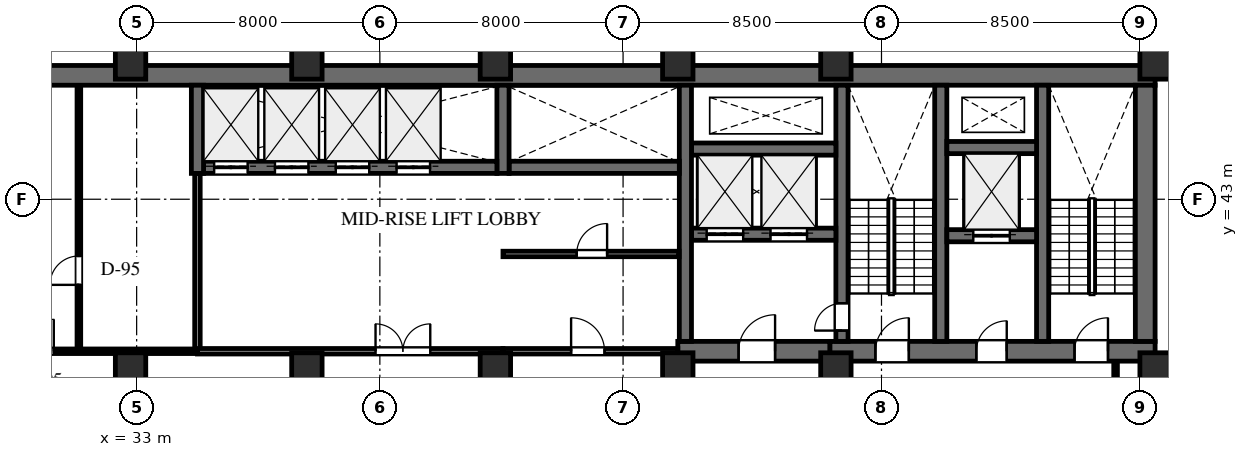
"""IFC4 building model, lengths in metres.
Left out: names, types, materials, properties, quantities, classifications, styles, units other than length and angle.
Written with IfcOpenShell. Run it as: python <this file> out.ifc"""

import sys

from ifc_helpers import new_model, si_unit, direction, frame, frame_2d, origin, origin_2d, place, context, subcontext, project, spatial, rectangle, extrude, element, fill, save


model = new_model("IFC4")
c1 = context("Model", 3, precision=1e-05, world=origin(), true_north=direction((0.0, 1.0)))
c2 = subcontext(c1, "Body", "Model", "MODEL_VIEW")
j1 = project(units=[si_unit("LENGTHUNIT", "METRE"), si_unit("PLANEANGLEUNIT", "RADIAN")], contexts=[c1])
p1 = place(None, origin())
s1 = spatial("IfcSite", under=j1, at=p1, CompositionType="ELEMENT")
p2 = place(p1, origin())
s2 = spatial("IfcBuilding", under=s1, at=p2, CompositionType="ELEMENT")
p3 = place(p2, frame((0.0, 0.0, 136.0)))
s3 = spatial("IfcBuildingStorey", under=s2, at=p3, CompositionType="ELEMENT", Elevation=136.0)
p4 = place(p3, frame((22.9, 47.075, 0.0), z_axis=(0.0, 0.0, 1.0), x_axis=(1.0, 0.0, 0.0)))
e1 = element("IfcWall", 1, at=p4, inside=s3, PredefinedType="SHEAR", context=c2, shape_type="SweptSolid", body=[
    extrude(rectangle(XDim=43.6, YDim=0.65, at=frame_2d((21.8, 0.0))), origin(), (0.0, 0.0, 1.0), 4.0),
])
p5 = place(p3, frame((55.8, 38.0, 0.0), z_axis=(0.0, 0.0, 1.0), x_axis=(1.0, 0.0, 0.0)))
e2 = element("IfcWall", 2, at=p5, inside=s3, PredefinedType="SHEAR", context=c2, shape_type="SweptSolid", body=[
    extrude(rectangle(XDim=10.7, YDim=0.65, at=frame_2d((5.35, 0.0))), origin(), (0.0, 0.0, 1.0), 4.0),
])
p6 = place(p5, frame((1.5, 0.0, 0.0)))
e3 = element("IfcOpeningElement", 3, at=p6, cuts=e2, PredefinedType="OPENING", context=c2, shape_type="SweptSolid", body=[
    extrude(rectangle(XDim=1.1, YDim=2.2, at=frame_2d((0.55, 1.1))), frame((0.0, 0.335, 0.0), z_axis=(0.0, -1.0, 0.0), x_axis=(1.0, 0.0, 0.0)), (0.0, 0.0, 1.0), 0.67),
])
p7 = place(p5, frame((4.82, 0.0, 0.0)))
e4 = element("IfcOpeningElement", 4, at=p7, cuts=e2, PredefinedType="OPENING", context=c2, shape_type="SweptSolid", body=[
    extrude(rectangle(XDim=1.0, YDim=2.15, at=frame_2d((0.5, 1.075))), frame((0.0, 0.335, 0.0), z_axis=(0.0, -1.0, 0.0), x_axis=(1.0, 0.0, 0.0)), (0.0, 0.0, 1.0), 0.67),
])
p8 = place(p5, frame((8.05, 0.0, 0.0)))
e5 = element("IfcOpeningElement", 5, at=p8, cuts=e2, PredefinedType="OPENING", context=c2, shape_type="SweptSolid", body=[
    extrude(rectangle(XDim=1.1, YDim=2.2, at=frame_2d((0.55, 1.1))), frame((0.0, 0.335, 0.0), z_axis=(0.0, -1.0, 0.0), x_axis=(1.0, 0.0, 0.0)), (0.0, 0.0, 1.0), 0.67),
])
p9 = place(p3, frame((66.175, 38.325, 0.0), z_axis=(0.0, 0.0, 1.0), x_axis=(0.0, 1.0, 0.0)))
e6 = element("IfcWall", 6, at=p9, inside=s3, PredefinedType="SHEAR", context=c2, shape_type="SweptSolid", body=[
    extrude(rectangle(XDim=8.425, YDim=0.65, at=frame_2d((4.212, 0.0))), origin(), (0.0, 0.0, 1.0), 4.0),
])
for number, where, z_axis, x_axis in (
    (7, (62.8, 38.325, 0.0), (0.0, 0.0, 1.0), (0.0, 1.0, 0.0)),
    (8, (59.45, 38.325, 0.0), (0.0, 0.0, 1.0), (0.0, 1.0, 0.0)),
):
    element("IfcWall", number, at=place(p3, frame(where, z_axis=z_axis, x_axis=x_axis)), inside=s3, PredefinedType="SHEAR", context=c2, shape_type="SweptSolid", body=[
        extrude(rectangle(XDim=8.425, YDim=0.4, at=frame_2d((4.212, 0.0))), origin(), (0.0, 0.0, 1.0), 4.0),
    ])
p10 = place(p3, frame((56.2, 38.325, 0.0), z_axis=(0.0, 0.0, 1.0), x_axis=(0.0, 1.0, 0.0)))
e9 = element("IfcWall", 9, at=p10, inside=s3, PredefinedType="SHEAR", context=c2, shape_type="SweptSolid", body=[
    extrude(rectangle(XDim=8.425, YDim=0.4, at=frame_2d((4.212, 0.0))), origin(), (0.0, 0.0, 1.0), 4.0),
])
p11 = place(p10, frame((0.355, 0.0, 0.0)))
e10 = element("IfcOpeningElement", 10, at=p11, cuts=e9, PredefinedType="OPENING", context=c2, shape_type="SweptSolid", body=[
    extrude(rectangle(XDim=0.9, YDim=2.15, at=frame_2d((0.45, 1.075))), frame((0.0, 0.21, 0.0), z_axis=(0.0, -1.0, 0.0), x_axis=(1.0, 0.0, 0.0)), (0.0, 0.0, 1.0), 0.42),
])
p12 = place(p3, frame((59.65, 41.8, 0.0), z_axis=(0.0, 0.0, 1.0), x_axis=(1.0, 0.0, 0.0)))
e11 = element("IfcWall", 11, at=p12, inside=s3, PredefinedType="SHEAR", context=c2, shape_type="SweptSolid", body=[
    extrude(rectangle(XDim=2.95, YDim=0.4, at=frame_2d((1.475, 0.0))), origin(), (0.0, 0.0, 1.0), 4.0),
])
p13 = place(p12, frame((0.87, 0.0, 0.0)))
e12 = element("IfcOpeningElement", 12, at=p13, cuts=e11, PredefinedType="OPENING", context=c2, shape_type="SweptSolid", body=[
    extrude(rectangle(XDim=1.2, YDim=2.2, at=frame_2d((0.6, 1.1))), frame((0.0, 0.21, 0.0), z_axis=(0.0, -1.0, 0.0), x_axis=(1.0, 0.0, 0.0)), (0.0, 0.0, 1.0), 0.42),
])
p14 = place(p3, frame((59.65, 44.7, 0.0), z_axis=(0.0, 0.0, 1.0), x_axis=(1.0, 0.0, 0.0)))
e13 = element("IfcWall", 13, at=p14, inside=s3, PredefinedType="SHEAR", context=c2, shape_type="SweptSolid", body=[
    extrude(rectangle(XDim=2.95, YDim=0.4, at=frame_2d((1.475, 0.0))), origin(), (0.0, 0.0, 1.0), 4.0),
])
p15 = place(p3, frame((50.8, 38.0, 0.0), z_axis=(0.0, 0.0, 1.0), x_axis=(1.0, 0.0, 0.0)))
e14 = element("IfcWall", 14, at=p15, inside=s3, PredefinedType="SHEAR", context=c2, shape_type="SweptSolid", body=[
    extrude(rectangle(XDim=5.0, YDim=0.65, at=frame_2d((2.5, 0.0))), origin(), (0.0, 0.0, 1.0), 4.0),
])
p16 = place(p15, frame((2.0, 0.0, 0.0)))
e15 = element("IfcOpeningElement", 15, at=p16, cuts=e14, PredefinedType="OPENING", context=c2, shape_type="SweptSolid", body=[
    extrude(rectangle(XDim=1.2, YDim=2.2, at=frame_2d((0.6, 1.1))), frame((0.0, 0.335, 0.0), z_axis=(0.0, -1.0, 0.0), x_axis=(1.0, 0.0, 0.0)), (0.0, 0.0, 1.0), 0.67),
])
p17 = place(p3, frame((51.25, 41.85, 0.0), z_axis=(0.0, 0.0, 1.0), x_axis=(1.0, 0.0, 0.0)))
e16 = element("IfcWall", 16, at=p17, inside=s3, PredefinedType="SHEAR", context=c2, shape_type="SweptSolid", body=[
    extrude(rectangle(XDim=4.75, YDim=0.4, at=frame_2d((2.375, 0.0))), origin(), (0.0, 0.0, 1.0), 4.0),
])
p18 = place(p17, frame((0.5, 0.0, 0.0)))
e17 = element("IfcOpeningElement", 17, at=p18, cuts=e16, PredefinedType="OPENING", context=c2, shape_type="SweptSolid", body=[
    extrude(rectangle(XDim=1.2, YDim=2.2, at=frame_2d((0.6, 1.1))), frame((0.0, 0.21, 0.0), z_axis=(0.0, -1.0, 0.0), x_axis=(1.0, 0.0, 0.0)), (0.0, 0.0, 1.0), 0.42),
])
p19 = place(p17, frame((2.6, 0.0, 0.0)))
e18 = element("IfcOpeningElement", 18, at=p19, cuts=e16, PredefinedType="OPENING", context=c2, shape_type="SweptSolid", body=[
    extrude(rectangle(XDim=1.2, YDim=2.2, at=frame_2d((0.6, 1.1))), frame((0.0, 0.21, 0.0), z_axis=(0.0, -1.0, 0.0), x_axis=(1.0, 0.0, 0.0)), (0.0, 0.0, 1.0), 0.42),
])
p20 = place(p3, frame((51.25, 44.65, 0.0), z_axis=(0.0, 0.0, 1.0), x_axis=(1.0, 0.0, 0.0)))
e19 = element("IfcWall", 19, at=p20, inside=s3, PredefinedType="SHEAR", context=c2, shape_type="SweptSolid", body=[
    extrude(rectangle(XDim=4.75, YDim=0.4, at=frame_2d((2.375, 0.0))), origin(), (0.0, 0.0, 1.0), 4.0),
])
p21 = place(p3, frame((51.05, 38.325, 0.0), z_axis=(0.0, 0.0, 1.0), x_axis=(0.0, 1.0, 0.0)))
e20 = element("IfcWall", 20, at=p21, inside=s3, PredefinedType="SHEAR", context=c2, shape_type="SweptSolid", body=[
    extrude(rectangle(XDim=8.425, YDim=0.4, at=frame_2d((4.212, 0.0))), origin(), (0.0, 0.0, 1.0), 4.0),
])
p22 = place(p3, frame((45.25, 44.05, 0.0), z_axis=(0.0, 0.0, 1.0), x_axis=(1.0, 0.0, 0.0)))
e21 = element("IfcWall", 21, at=p22, inside=s3, PredefinedType="SHEAR", context=c2, shape_type="SweptSolid", body=[
    extrude(rectangle(XDim=5.6, YDim=0.4, at=frame_2d((2.8, 0.0))), origin(), (0.0, 0.0, 1.0), 4.0),
])
p23 = place(p3, frame((45.05, 43.85, 0.0), z_axis=(0.0, 0.0, 1.0), x_axis=(0.0, 1.0, 0.0)))
e22 = element("IfcWall", 22, at=p23, inside=s3, PredefinedType="SHEAR", context=c2, shape_type="SweptSolid", body=[
    extrude(rectangle(XDim=2.9, YDim=0.4, at=frame_2d((1.45, 0.0))), origin(), (0.0, 0.0, 1.0), 4.0),
])
p24 = place(p3, frame((35.2, 44.05, 0.0), z_axis=(0.0, 0.0, 1.0), x_axis=(1.0, 0.0, 0.0)))
e23 = element("IfcWall", 23, at=p24, inside=s3, PredefinedType="SHEAR", context=c2, shape_type="SweptSolid", body=[
    extrude(rectangle(XDim=9.65, YDim=0.4, at=frame_2d((4.825, 0.0))), origin(), (0.0, 0.0, 1.0), 4.0),
])
p25 = place(p24, frame((0.35, 0.0, 0.0)))
e24 = element("IfcOpeningElement", 24, at=p25, cuts=e23, PredefinedType="OPENING", context=c2, shape_type="SweptSolid", body=[
    extrude(rectangle(XDim=1.1, YDim=2.2, at=frame_2d((0.55, 1.1))), frame((0.0, 0.21, 0.0), z_axis=(0.0, -1.0, 0.0), x_axis=(1.0, 0.0, 0.0)), (0.0, 0.0, 1.0), 0.42),
])
p26 = place(p24, frame((2.35, 0.0, 0.0)))
e25 = element("IfcOpeningElement", 25, at=p26, cuts=e23, PredefinedType="OPENING", context=c2, shape_type="SweptSolid", body=[
    extrude(rectangle(XDim=1.1, YDim=2.2, at=frame_2d((0.55, 1.1))), frame((0.0, 0.21, 0.0), z_axis=(0.0, -1.0, 0.0), x_axis=(1.0, 0.0, 0.0)), (0.0, 0.0, 1.0), 0.42),
])
p27 = place(p24, frame((4.35, 0.0, 0.0)))
e26 = element("IfcOpeningElement", 26, at=p27, cuts=e23, PredefinedType="OPENING", context=c2, shape_type="SweptSolid", body=[
    extrude(rectangle(XDim=1.1, YDim=2.2, at=frame_2d((0.55, 1.1))), frame((0.0, 0.21, 0.0), z_axis=(0.0, -1.0, 0.0), x_axis=(1.0, 0.0, 0.0)), (0.0, 0.0, 1.0), 0.42),
])
p28 = place(p24, frame((6.35, 0.0, 0.0)))
e27 = element("IfcOpeningElement", 27, at=p28, cuts=e23, PredefinedType="OPENING", context=c2, shape_type="SweptSolid", body=[
    extrude(rectangle(XDim=1.1, YDim=2.2, at=frame_2d((0.55, 1.1))), frame((0.0, 0.21, 0.0), z_axis=(0.0, -1.0, 0.0), x_axis=(1.0, 0.0, 0.0)), (0.0, 0.0, 1.0), 0.42),
])
p29 = place(p3, frame((35.0, 43.85, 0.0), z_axis=(0.0, 0.0, 1.0), x_axis=(0.0, 1.0, 0.0)))
e28 = element("IfcWall", 28, at=p29, inside=s3, PredefinedType="SHEAR", context=c2, shape_type="SweptSolid", body=[
    extrude(rectangle(XDim=2.9, YDim=0.4, at=frame_2d((1.45, 0.0))), origin(), (0.0, 0.0, 1.0), 4.0),
])
for number, where, z_axis, x_axis in (
    (29, (66.5, 47.55, 0.0), (0.0, 0.0, 1.0), (1.0, 0.0, 0.0)),
    (30, (56.0, 47.55, 0.0), (0.0, 0.0, 1.0), (1.0, 0.0, 0.0)),
    (31, (66.5, 37.35, 0.0), (0.0, 0.0, 1.0), (1.0, 0.0, 0.0)),
    (32, (56.0, 37.35, 0.0), (0.0, 0.0, 1.0), (1.0, 0.0, 0.0)),
    (33, (50.8, 47.55, 0.0), (0.0, 0.0, 1.0), (1.0, 0.0, 0.0)),
    (34, (50.8, 37.35, 0.0), (0.0, 0.0, 1.0), (1.0, 0.0, 0.0)),
    (35, (44.8, 37.35, 0.0), (0.0, 0.0, 1.0), (1.0, 0.0, 0.0)),
    (36, (44.8, 47.55, 0.0), (0.0, 0.0, 1.0), (1.0, 0.0, 0.0)),
    (37, (38.6, 37.35, 0.0), (0.0, 0.0, 1.0), (1.0, 0.0, 0.0)),
    (38, (38.6, 47.55, 0.0), (0.0, 0.0, 1.0), (1.0, 0.0, 0.0)),
    (39, (32.8, 37.35, 0.0), (0.0, 0.0, 1.0), (1.0, 0.0, 0.0)),
    (40, (32.8, 47.55, 0.0), (0.0, 0.0, 1.0), (1.0, 0.0, 0.0)),
):
    element("IfcColumn", number, at=place(p3, frame(where, z_axis=z_axis, x_axis=x_axis)), inside=s3, PredefinedType="COLUMN", context=c2, shape_type="SweptSolid", body=[
        extrude(rectangle(XDim=1.0, YDim=1.2, at=origin_2d()), origin(), (0.0, 0.0, 1.0), 4.0),
    ])
p30 = place(p3, frame((68.375, 37.8, 0.0), z_axis=(0.0, 0.0, 1.0), x_axis=(-0.13917001236, -0.990268502811, 0.0)))
e41 = element("IfcWall", 41, at=p30, inside=s3, PredefinedType="STANDARD", context=c2, shape_type="SweptSolid", body=[
    extrude(rectangle(XDim=29.549, YDim=0.28, at=frame_2d((14.774, 0.0))), origin(), (0.0, 0.0, 1.0), 3.75),
])
p31 = place(p30, frame((8.117, 0.0, 0.0)))
e42 = element("IfcOpeningElement", 42, at=p31, cuts=e41, PredefinedType="OPENING", context=c2, shape_type="SweptSolid", body=[
    extrude(rectangle(XDim=1.0, YDim=2.15, at=frame_2d((0.5, 1.075))), frame((0.0, 0.15, 0.0), z_axis=(0.0, -1.0, 0.0), x_axis=(1.0, 0.0, 0.0)), (0.0, 0.0, 1.0), 0.3),
])
p32 = place(p30, frame((3.851, 0.0, 0.65)))
e43 = element("IfcOpeningElement", 43, at=p32, cuts=e41, PredefinedType="OPENING", context=c2, shape_type="SweptSolid", body=[
    extrude(rectangle(XDim=1.8, YDim=2.1, at=frame_2d((0.9, 1.05))), frame((0.0, 0.15, 0.0), z_axis=(0.0, -1.0, 0.0), x_axis=(1.0, 0.0, 0.0)), (0.0, 0.0, 1.0), 0.3),
])
p33 = place(p30, frame((18.136, 0.0, 0.65)))
e44 = element("IfcOpeningElement", 44, at=p33, cuts=e41, PredefinedType="OPENING", context=c2, shape_type="SweptSolid", body=[
    extrude(rectangle(XDim=1.8, YDim=2.1, at=frame_2d((0.9, 1.05))), frame((0.0, 0.15, 0.0), z_axis=(0.0, -1.0, 0.0), x_axis=(1.0, 0.0, 0.0)), (0.0, 0.0, 1.0), 0.3),
])
p34 = place(p3, frame((45.05, 38.0, 0.0), z_axis=(0.0, 0.0, 1.0), x_axis=(1.0, 0.0, 0.0)))
e45 = element("IfcWall", 45, at=p34, inside=s3, PredefinedType="STANDARD", context=c2, shape_type="SweptSolid", body=[
    extrude(rectangle(XDim=5.75, YDim=0.18, at=frame_2d((2.875, 0.0))), origin(), (0.0, 0.0, 1.0), 2.894),
])
p35 = place(p34, frame((2.24, 0.0, 0.0)))
e46 = element("IfcOpeningElement", 46, at=p35, cuts=e45, PredefinedType="OPENING", context=c2, shape_type="SweptSolid", body=[
    extrude(rectangle(XDim=1.1, YDim=2.2, at=frame_2d((0.55, 1.1))), frame((0.0, 0.1, 0.0), z_axis=(0.0, -1.0, 0.0), x_axis=(1.0, 0.0, 0.0)), (0.0, 0.0, 1.0), 0.2),
])
p36 = place(p3, frame((45.05, 41.2, 0.0), z_axis=(0.0, 0.0, 1.0), x_axis=(1.0, 0.0, 0.0)))
e47 = element("IfcWall", 47, at=p36, inside=s3, PredefinedType="STANDARD", context=c2, shape_type="SweptSolid", body=[
    extrude(rectangle(XDim=5.792, YDim=0.18, at=frame_2d((2.896, 0.0))), origin(), (0.0, 0.0, 1.0), 2.894),
])
p37 = place(p36, frame((2.425, 0.0, 0.0)))
e48 = element("IfcOpeningElement", 48, at=p37, cuts=e47, PredefinedType="OPENING", context=c2, shape_type="SweptSolid", body=[
    extrude(rectangle(XDim=1.0, YDim=2.15, at=frame_2d((0.5, 1.075))), frame((0.0, 0.1, 0.0), z_axis=(0.0, -1.0, 0.0), x_axis=(1.0, 0.0, 0.0)), (0.0, 0.0, 1.0), 0.2),
])
p38 = place(p3, frame((27.05, 38.0, 0.0), z_axis=(0.0, 0.0, 1.0), x_axis=(1.0, 0.0, 0.0)))
e49 = element("IfcWall", 49, at=p38, inside=s3, PredefinedType="PARTITIONING", context=c2, shape_type="SweptSolid", body=[
    extrude(rectangle(XDim=7.95, YDim=0.15, at=frame_2d((3.975, 0.0))), origin(), (0.0, 0.0, 1.0), 2.894),
])
p39 = place(p38, frame((2.175, 0.0, 0.0)))
e50 = element("IfcOpeningElement", 50, at=p39, cuts=e49, PredefinedType="OPENING", context=c2, shape_type="SweptSolid", body=[
    extrude(rectangle(XDim=1.05, YDim=2.2, at=frame_2d((0.525, 1.1))), frame((0.0, 0.085, 0.0), z_axis=(0.0, -1.0, 0.0), x_axis=(1.0, 0.0, 0.0)), (0.0, 0.0, 1.0), 0.17),
])
p40 = place(p3, frame((35.0, 38.0, 0.0), z_axis=(0.0, 0.0, 1.0), x_axis=(0.0, 1.0, 0.0)))
e51 = element("IfcWall", 51, at=p40, inside=s3, PredefinedType="STANDARD", context=c2, shape_type="SweptSolid", body=[
    extrude(rectangle(XDim=5.85, YDim=0.18, at=frame_2d((2.925, 0.0))), origin(), (0.0, 0.0, 1.0), 3.75),
])
p41 = place(p3, frame((31.1, 38.068, 0.0), z_axis=(0.0, 0.0, 1.0), x_axis=(0.0, 1.0, 0.0)))
e52 = element("IfcWall", 52, at=p41, inside=s3, PredefinedType="PARTITIONING", context=c2, shape_type="SweptSolid", body=[
    extrude(rectangle(XDim=8.674, YDim=0.12, at=frame_2d((4.337, 0.0))), origin(), (0.0, 0.0, 1.0), 3.75),
])
p42 = place(p41, frame((2.116, 0.0, 0.0)))
e53 = element("IfcOpeningElement", 53, at=p42, cuts=e52, PredefinedType="OPENING", context=c2, shape_type="SweptSolid", body=[
    extrude(rectangle(XDim=0.95, YDim=2.15, at=frame_2d((0.475, 1.075))), frame((0.0, 0.07, 0.0), z_axis=(0.0, -1.0, 0.0), x_axis=(1.0, 0.0, 0.0)), (0.0, 0.0, 1.0), 0.14),
])
p43 = place(p3, frame((35.0, 38.0, 0.0), z_axis=(0.0, 0.0, 1.0), x_axis=(1.0, 0.0, 0.0)))
e54 = element("IfcWall", 54, at=p43, inside=s3, PredefinedType="STANDARD", context=c2, shape_type="SweptSolid", body=[
    extrude(rectangle(XDim=10.05, YDim=0.18, at=frame_2d((5.025, 0.0))), origin(), (0.0, 0.0, 1.0), 2.894),
])
p44 = place(p43, frame((5.858, 0.0, 0.0)))
e55 = element("IfcOpeningElement", 55, at=p44, cuts=e54, PredefinedType="OPENING", context=c2, shape_type="SweptSolid", body=[
    extrude(rectangle(XDim=1.8, YDim=2.2, at=frame_2d((0.9, 1.1))), frame((0.0, 0.1, 0.0), z_axis=(0.0, -1.0, 0.0), x_axis=(1.0, 0.0, 0.0)), (0.0, 0.0, 1.0), 0.2),
])
p45 = place(p3, frame((65.2, 34.4, 0.0), z_axis=(0.0, 0.0, 1.0), x_axis=(0.0, 1.0, 0.0)))
e56 = element("IfcWall", 56, at=p45, inside=s3, PredefinedType="PARTITIONING", context=c2, shape_type="SweptSolid", body=[
    extrude(rectangle(XDim=3.267, YDim=0.12, at=frame_2d((1.634, 0.0))), origin(), (0.0, 0.0, 1.0), 2.894),
])
p46 = place(p6, origin())
e57 = element("IfcDoor", 57, at=p46, inside=s3, OperationType="SINGLE_SWING_RIGHT", PredefinedType="DOOR", context=c2, shape_type="SweptSolid", body=[
    extrude(rectangle(XDim=1.1, YDim=2.2, at=frame_2d((0.55, 1.1))), frame((0.0, 0.025, 0.0), z_axis=(0.0, -1.0, 0.0), x_axis=(1.0, 0.0, 0.0)), (0.0, 0.0, 1.0), 0.05),
])
fill(e3, e57)
p47 = place(p7, origin())
e58 = element("IfcDoor", 58, at=p47, inside=s3, OperationType="SINGLE_SWING_RIGHT", PredefinedType="DOOR", context=c2, shape_type="SweptSolid", body=[
    extrude(rectangle(XDim=1.0, YDim=2.15, at=frame_2d((0.5, 1.075))), frame((0.0, 0.025, 0.0), z_axis=(0.0, -1.0, 0.0), x_axis=(1.0, 0.0, 0.0)), (0.0, 0.0, 1.0), 0.05),
])
fill(e4, e58)
p48 = place(p8, origin())
e59 = element("IfcDoor", 59, at=p48, inside=s3, OperationType="SINGLE_SWING_RIGHT", PredefinedType="DOOR", context=c2, shape_type="SweptSolid", body=[
    extrude(rectangle(XDim=1.1, YDim=2.2, at=frame_2d((0.55, 1.1))), frame((0.0, 0.025, 0.0), z_axis=(0.0, -1.0, 0.0), x_axis=(1.0, 0.0, 0.0)), (0.0, 0.0, 1.0), 0.05),
])
fill(e5, e59)
p49 = place(p16, origin())
e60 = element("IfcDoor", 60, at=p49, inside=s3, OperationType="SINGLE_SWING_RIGHT", PredefinedType="DOOR", context=c2, shape_type="SweptSolid", body=[
    extrude(rectangle(XDim=1.2, YDim=2.2, at=frame_2d((0.6, 1.1))), frame((0.0, 0.025, 0.0), z_axis=(0.0, -1.0, 0.0), x_axis=(1.0, 0.0, 0.0)), (0.0, 0.0, 1.0), 0.05),
])
fill(e15, e60)
p50 = place(p11, origin())
e61 = element("IfcDoor", 61, at=p50, inside=s3, OperationType="SINGLE_SWING_LEFT", PredefinedType="DOOR", context=c2, shape_type="SweptSolid", body=[
    extrude(rectangle(XDim=0.9, YDim=2.15, at=frame_2d((0.45, 1.075))), frame((0.0, 0.025, 0.0), z_axis=(0.0, -1.0, 0.0), x_axis=(1.0, 0.0, 0.0)), (0.0, 0.0, 1.0), 0.05),
])
fill(e10, e61)
p51 = place(p25, origin())
e62 = element("IfcDoor", 62, at=p51, inside=s3, OperationType="DOUBLE_DOOR_SLIDING", PredefinedType="DOOR", context=c2, shape_type="SweptSolid", body=[
    extrude(rectangle(XDim=1.1, YDim=2.2, at=frame_2d((0.55, 1.1))), frame((0.0, 0.025, 0.0), z_axis=(0.0, -1.0, 0.0), x_axis=(1.0, 0.0, 0.0)), (0.0, 0.0, 1.0), 0.05),
])
fill(e24, e62)
p52 = place(p26, origin())
e63 = element("IfcDoor", 63, at=p52, inside=s3, OperationType="DOUBLE_DOOR_SLIDING", PredefinedType="DOOR", context=c2, shape_type="SweptSolid", body=[
    extrude(rectangle(XDim=1.1, YDim=2.2, at=frame_2d((0.55, 1.1))), frame((0.0, 0.025, 0.0), z_axis=(0.0, -1.0, 0.0), x_axis=(1.0, 0.0, 0.0)), (0.0, 0.0, 1.0), 0.05),
])
fill(e25, e63)
p53 = place(p27, origin())
e64 = element("IfcDoor", 64, at=p53, inside=s3, OperationType="DOUBLE_DOOR_SLIDING", PredefinedType="DOOR", context=c2, shape_type="SweptSolid", body=[
    extrude(rectangle(XDim=1.1, YDim=2.2, at=frame_2d((0.55, 1.1))), frame((0.0, 0.025, 0.0), z_axis=(0.0, -1.0, 0.0), x_axis=(1.0, 0.0, 0.0)), (0.0, 0.0, 1.0), 0.05),
])
fill(e26, e64)
p54 = place(p28, origin())
e65 = element("IfcDoor", 65, at=p54, inside=s3, OperationType="DOUBLE_DOOR_SLIDING", PredefinedType="DOOR", context=c2, shape_type="SweptSolid", body=[
    extrude(rectangle(XDim=1.1, YDim=2.2, at=frame_2d((0.55, 1.1))), frame((0.0, 0.025, 0.0), z_axis=(0.0, -1.0, 0.0), x_axis=(1.0, 0.0, 0.0)), (0.0, 0.0, 1.0), 0.05),
])
fill(e27, e65)
p55 = place(p18, origin())
e66 = element("IfcDoor", 66, at=p55, inside=s3, OperationType="DOUBLE_DOOR_SLIDING", PredefinedType="DOOR", context=c2, shape_type="SweptSolid", body=[
    extrude(rectangle(XDim=1.2, YDim=2.2, at=frame_2d((0.6, 1.1))), frame((0.0, 0.025, 0.0), z_axis=(0.0, -1.0, 0.0), x_axis=(1.0, 0.0, 0.0)), (0.0, 0.0, 1.0), 0.05),
])
fill(e17, e66)
p56 = place(p19, origin())
e67 = element("IfcDoor", 67, at=p56, inside=s3, OperationType="DOUBLE_DOOR_SLIDING", PredefinedType="DOOR", context=c2, shape_type="SweptSolid", body=[
    extrude(rectangle(XDim=1.2, YDim=2.2, at=frame_2d((0.6, 1.1))), frame((0.0, 0.025, 0.0), z_axis=(0.0, -1.0, 0.0), x_axis=(1.0, 0.0, 0.0)), (0.0, 0.0, 1.0), 0.05),
])
fill(e18, e67)
p57 = place(p13, origin())
e68 = element("IfcDoor", 68, at=p57, inside=s3, OperationType="DOUBLE_DOOR_SLIDING", PredefinedType="DOOR", context=c2, shape_type="SweptSolid", body=[
    extrude(rectangle(XDim=1.2, YDim=2.2, at=frame_2d((0.6, 1.1))), frame((0.0, 0.025, 0.0), z_axis=(0.0, -1.0, 0.0), x_axis=(1.0, 0.0, 0.0)), (0.0, 0.0, 1.0), 0.05),
])
fill(e12, e68)
p58 = place(p37, origin())
e69 = element("IfcDoor", 69, at=p58, inside=s3, OperationType="SINGLE_SWING_RIGHT", PredefinedType="DOOR", context=c2, shape_type="SweptSolid", body=[
    extrude(rectangle(XDim=1.0, YDim=2.15, at=frame_2d((0.5, 1.075))), frame((0.0, 0.025, 0.0), z_axis=(0.0, -1.0, 0.0), x_axis=(1.0, 0.0, 0.0)), (0.0, 0.0, 1.0), 0.05),
])
fill(e48, e69)
p59 = place(p35, origin())
e70 = element("IfcDoor", 70, at=p59, inside=s3, OperationType="SINGLE_SWING_LEFT", PredefinedType="DOOR", context=c2, shape_type="SweptSolid", body=[
    extrude(rectangle(XDim=1.1, YDim=2.2, at=frame_2d((0.55, 1.1))), frame((0.0, 0.025, 0.0), z_axis=(0.0, -1.0, 0.0), x_axis=(1.0, 0.0, 0.0)), (0.0, 0.0, 1.0), 0.05),
])
fill(e46, e70)
p60 = place(p39, origin())
e71 = element("IfcDoor", 71, at=p60, inside=s3, OperationType="SINGLE_SWING_RIGHT", PredefinedType="DOOR", context=c2, shape_type="SweptSolid", body=[
    extrude(rectangle(XDim=1.05, YDim=2.2, at=frame_2d((0.525, 1.1))), frame((0.0, 0.025, 0.0), z_axis=(0.0, -1.0, 0.0), x_axis=(1.0, 0.0, 0.0)), (0.0, 0.0, 1.0), 0.05),
])
fill(e50, e71)
p61 = place(p42, origin())
e72 = element("IfcDoor", 72, at=p61, inside=s3, OperationType="SINGLE_SWING_LEFT", PredefinedType="DOOR", context=c2, shape_type="SweptSolid", body=[
    extrude(rectangle(XDim=0.95, YDim=2.15, at=frame_2d((0.475, 1.075))), frame((0.0, 0.025, 0.0), z_axis=(0.0, -1.0, 0.0), x_axis=(1.0, 0.0, 0.0)), (0.0, 0.0, 1.0), 0.05),
])
fill(e53, e72)
p62 = place(p44, origin())
e73 = element("IfcDoor", 73, at=p62, inside=s3, OperationType="DOUBLE_DOOR_SINGLE_SWING", PredefinedType="DOOR", context=c2, shape_type="SweptSolid", body=[
    extrude(rectangle(XDim=1.8, YDim=2.2, at=frame_2d((0.9, 1.1))), frame((0.0, 0.025, 0.0), z_axis=(0.0, -1.0, 0.0), x_axis=(1.0, 0.0, 0.0)), (0.0, 0.0, 1.0), 0.05),
])
fill(e55, e73)
save(model, sys.argv[1])
